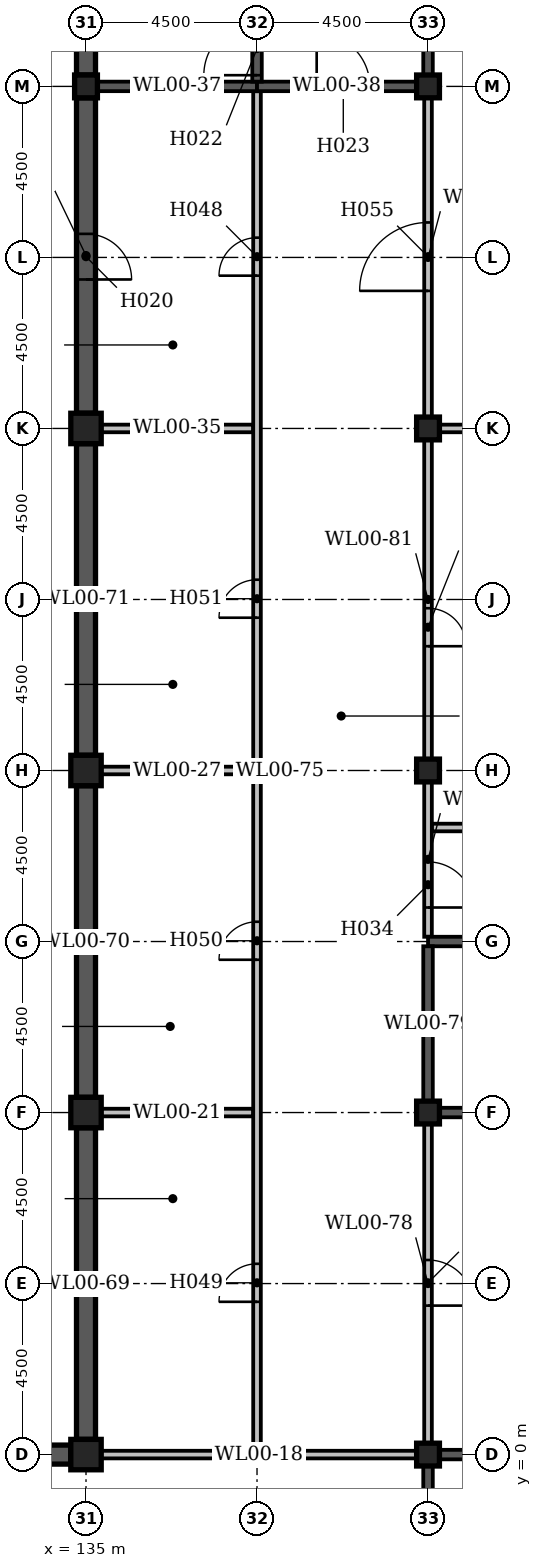
"""IFC4 building model, lengths in metres.
Left out: names, types, materials, properties, quantities, classifications, styles, units other than length and angle.
Written with IfcOpenShell. Run it as: python <this file> out.ifc"""

import sys

from ifc_helpers import new_model, si_unit, direction, frame, frame_2d, origin, origin_2d, place, context, subcontext, project, spatial, rectangle, extrude, element, fill, save


model = new_model("IFC4")
c1 = context("Model", 3, precision=1e-05, world=origin(), true_north=direction((0.0, 1.0)))
c2 = subcontext(c1, "Body", "Model", "MODEL_VIEW")
j1 = project(units=[si_unit("LENGTHUNIT", "METRE"), si_unit("PLANEANGLEUNIT", "RADIAN")], contexts=[c1])
p1 = place(None, origin())
s1 = spatial("IfcSite", under=j1, at=p1, CompositionType="ELEMENT")
p2 = place(p1, origin())
s2 = spatial("IfcBuilding", under=s1, at=p2, CompositionType="ELEMENT")
p3 = place(p2, origin())
s3 = spatial("IfcBuildingStorey", under=s2, at=p3, CompositionType="ELEMENT", Elevation=0.0)
for number, where, z_axis, x_axis in (
    (1, (135.0, 0.0, -0.3), (0.0, 0.0, 1.0), (1.0, 0.0, 0.0)),
    (2, (135.0, 9.0, -0.3), (0.0, 0.0, 1.0), (1.0, 0.0, 0.0)),
    (3, (135.0, 18.0, -0.3), (0.0, 0.0, 1.0), (1.0, 0.0, 0.0)),
    (4, (135.0, 27.0, -0.3), (0.0, 0.0, 1.0), (1.0, 0.0, 0.0)),
):
    element("IfcColumn", number, at=place(p3, frame(where, z_axis=z_axis, x_axis=x_axis)), inside=s3, PredefinedType="COLUMN", context=c2, shape_type="SweptSolid", body=[
        extrude(rectangle(XDim=0.8, YDim=0.8, at=origin_2d()), origin(), (0.0, 0.0, 1.0), 9.0),
    ])
p4 = place(p3, frame((135.0, 36.0, -0.3), z_axis=(0.0, 0.0, 1.0), x_axis=(1.0, 0.0, 0.0)))
e5 = element("IfcColumn", 5, at=p4, inside=s3, PredefinedType="COLUMN", context=c2, shape_type="SweptSolid", body=[
    extrude(rectangle(XDim=0.6, YDim=0.6, at=origin_2d()), origin(), (0.0, 0.0, 1.0), 9.0),
])
for number, where, z_axis, x_axis in (
    (6, (144.0, 0.0, 0.0), (0.0, 0.0, 1.0), (1.0, 0.0, 0.0)),
    (7, (144.0, 9.0, 0.0), (0.0, 0.0, 1.0), (1.0, 0.0, 0.0)),
    (8, (144.0, 18.0, 0.0), (0.0, 0.0, 1.0), (1.0, 0.0, 0.0)),
    (9, (144.0, 27.0, 0.0), (0.0, 0.0, 1.0), (1.0, 0.0, 0.0)),
    (10, (144.0, 36.0, 0.0), (0.0, 0.0, 1.0), (1.0, 0.0, 0.0)),
):
    element("IfcColumn", number, at=place(p3, frame(where, z_axis=z_axis, x_axis=x_axis)), inside=s3, PredefinedType="COLUMN", context=c2, shape_type="SweptSolid", body=[
        extrude(rectangle(XDim=0.6, YDim=0.6, at=origin_2d()), origin(), (0.0, 0.0, 1.0), 8.7),
    ])
p5 = place(p3, frame((126.3, 0.0, 0.0), z_axis=(0.0, 0.0, 1.0), x_axis=(1.0, 0.0, 0.0)))
e11 = element("IfcWall", 11, at=p5, inside=s3, PredefinedType="STANDARD", context=c2, shape_type="SweptSolid", body=[
    extrude(rectangle(XDim=8.3, YDim=0.5, at=frame_2d((4.15, 0.0))), origin(), (0.0, 0.0, 1.0), 9.0),
])
p6 = place(p5, frame((1.82, 0.0, 0.0)))
e12 = element("IfcOpeningElement", 12, at=p6, cuts=e11, PredefinedType="OPENING", context=c2, shape_type="SweptSolid", body=[
    extrude(rectangle(XDim=1.8, YDim=2.4, at=frame_2d((0.9, 1.2))), frame((0.0, 0.262, 0.0), z_axis=(0.0, -1.0, 0.0), x_axis=(1.0, 0.0, 0.0)), (0.0, 0.0, 1.0), 0.524),
])
p7 = place(p3, frame((135.4, 0.0, 0.0), z_axis=(0.0, 0.0, 1.0), x_axis=(1.0, 0.0, 0.0)))
e13 = element("IfcWall", 13, at=p7, inside=s3, PredefinedType="STANDARD", context=c2, shape_type="SweptSolid", body=[
    extrude(rectangle(XDim=8.3, YDim=0.2, at=frame_2d((4.15, 0.0))), origin(), (0.0, 0.0, 1.0), 8.7),
])
p8 = place(p3, frame((144.3, 0.0, 0.0), z_axis=(0.0, 0.0, 1.0), x_axis=(1.0, 0.0, 0.0)))
e14 = element("IfcWall", 14, at=p8, inside=s3, PredefinedType="STANDARD", context=c2, shape_type="SweptSolid", body=[
    extrude(rectangle(XDim=4.2, YDim=0.25, at=frame_2d((2.1, 0.0))), origin(), (0.0, 0.0, 1.0), 9.0),
])
p9 = place(p3, frame((135.4, 9.0, 0.0), z_axis=(0.0, 0.0, 1.0), x_axis=(1.0, 0.0, 0.0)))
e15 = element("IfcWall", 15, at=p9, inside=s3, PredefinedType="STANDARD", context=c2, shape_type="SweptSolid", body=[
    extrude(rectangle(XDim=4.0, YDim=0.2, at=frame_2d((2.0, 0.0))), origin(), (0.0, 0.0, 1.0), 8.7),
])
p10 = place(p3, frame((144.3, 9.0, 0.0), z_axis=(0.0, 0.0, 1.0), x_axis=(1.0, 0.0, 0.0)))
e16 = element("IfcWall", 16, at=p10, inside=s3, PredefinedType="STANDARD", context=c2, shape_type="SweptSolid", body=[
    extrude(rectangle(XDim=4.2, YDim=0.25, at=frame_2d((2.1, 0.0))), origin(), (0.0, 0.0, 1.0), 9.0),
])
p11 = place(p3, frame((144.0, 13.5, 0.0), z_axis=(0.0, 0.0, 1.0), x_axis=(1.0, 0.0, 0.0)))
e17 = element("IfcWall", 17, at=p11, inside=s3, PredefinedType="STANDARD", context=c2, shape_type="SweptSolid", body=[
    extrude(rectangle(XDim=4.5, YDim=0.25, at=frame_2d((2.25, 0.0))), origin(), (0.0, 0.0, 1.0), 9.0),
])
p12 = place(p11, frame((1.72, 0.0, 0.0)))
e18 = element("IfcOpeningElement", 18, at=p12, cuts=e17, PredefinedType="OPENING", context=c2, shape_type="SweptSolid", body=[
    extrude(rectangle(XDim=1.1, YDim=2.1, at=frame_2d((0.55, 1.05))), frame((0.0, 0.137, 0.0), z_axis=(0.0, -1.0, 0.0), x_axis=(1.0, 0.0, 0.0)), (0.0, 0.0, 1.0), 0.274),
])
p13 = place(p3, frame((144.1, 16.5, 0.0), z_axis=(0.0, 0.0, 1.0), x_axis=(1.0, 0.0, 0.0)))
e19 = element("IfcWall", 19, at=p13, inside=s3, PredefinedType="STANDARD", context=c2, shape_type="SweptSolid", body=[
    extrude(rectangle(XDim=8.725, YDim=0.2, at=frame_2d((4.362, 0.0))), origin(), (0.0, 0.0, 1.0), 8.7),
])
for number, where, z_axis, x_axis in (
    (20, (135.4, 18.0, 0.0), (0.0, 0.0, 1.0), (1.0, 0.0, 0.0)),
    (21, (135.4, 27.0, 0.0), (0.0, 0.0, 1.0), (1.0, 0.0, 0.0)),
):
    element("IfcWall", number, at=place(p3, frame(where, z_axis=z_axis, x_axis=x_axis)), inside=s3, PredefinedType="STANDARD", context=c2, shape_type="SweptSolid", body=[
        extrude(rectangle(XDim=4.0, YDim=0.2, at=frame_2d((2.0, 0.0))), origin(), (0.0, 0.0, 1.0), 8.7),
    ])
p14 = place(p3, frame((144.3, 27.0, 0.0), z_axis=(0.0, 0.0, 1.0), x_axis=(1.0, 0.0, 0.0)))
e22 = element("IfcWall", 22, at=p14, inside=s3, PredefinedType="STANDARD", context=c2, shape_type="SweptSolid", body=[
    extrude(rectangle(XDim=8.4, YDim=0.2, at=frame_2d((4.2, 0.0))), origin(), (0.0, 0.0, 1.0), 8.7),
])
p15 = place(p3, frame((135.3, 36.0, 0.0), z_axis=(0.0, 0.0, 1.0), x_axis=(1.0, 0.0, 0.0)))
e23 = element("IfcWall", 23, at=p15, inside=s3, PredefinedType="STANDARD", context=c2, shape_type="SweptSolid", body=[
    extrude(rectangle(XDim=4.2, YDim=0.25, at=frame_2d((2.1, 0.0))), origin(), (0.0, 0.0, 1.0), 9.0),
])
p16 = place(p3, frame((139.5, 36.0, 0.0), z_axis=(0.0, 0.0, 1.0), x_axis=(1.0, 0.0, 0.0)))
e24 = element("IfcWall", 24, at=p16, inside=s3, PredefinedType="STANDARD", context=c2, shape_type="SweptSolid", body=[
    extrude(rectangle(XDim=4.2, YDim=0.25, at=frame_2d((2.1, 0.0))), origin(), (0.0, 0.0, 1.0), 8.7),
])
p17 = place(p16, frame((1.57, 0.0, 0.0)))
e25 = element("IfcOpeningElement", 25, at=p17, cuts=e24, PredefinedType="OPENING", context=c2, shape_type="SweptSolid", body=[
    extrude(rectangle(XDim=1.4, YDim=2.1, at=frame_2d((0.7, 1.05))), frame((0.0, 0.137, 0.0), z_axis=(0.0, -1.0, 0.0), x_axis=(1.0, 0.0, 0.0)), (0.0, 0.0, 1.0), 0.274),
])
for number, where, z_axis, x_axis in (
    (26, (135.0, 0.4, 0.0), (0.0, 0.0, 1.0), (0.0, 1.0, 0.0)),
    (27, (135.0, 9.4, 0.0), (0.0, 0.0, 1.0), (0.0, 1.0, 0.0)),
    (28, (135.0, 18.4, 0.0), (0.0, 0.0, 1.0), (0.0, 1.0, 0.0)),
):
    element("IfcWall", number, at=place(p3, frame(where, z_axis=z_axis, x_axis=x_axis)), inside=s3, PredefinedType="STANDARD", context=c2, shape_type="SweptSolid", body=[
        extrude(rectangle(XDim=8.2, YDim=0.5, at=frame_2d((4.1, 0.0))), origin(), (0.0, 0.0, 1.0), 9.0),
    ])
p18 = place(p3, frame((135.0, 27.4, 0.0), z_axis=(0.0, 0.0, 1.0), x_axis=(0.0, 1.0, 0.0)))
e29 = element("IfcWall", 29, at=p18, inside=s3, PredefinedType="STANDARD", context=c2, shape_type="SweptSolid", body=[
    extrude(rectangle(XDim=8.3, YDim=0.5, at=frame_2d((4.15, 0.0))), origin(), (0.0, 0.0, 1.0), 9.0),
])
p19 = place(p18, frame((3.52, 0.0, 0.0)))
e30 = element("IfcOpeningElement", 30, at=p19, cuts=e29, PredefinedType="OPENING", context=c2, shape_type="SweptSolid", body=[
    extrude(rectangle(XDim=1.2, YDim=2.4, at=frame_2d((0.6, 1.2))), frame((0.0, 0.262, 0.0), z_axis=(0.0, -1.0, 0.0), x_axis=(1.0, 0.0, 0.0)), (0.0, 0.0, 1.0), 0.524),
])
p20 = place(p3, frame((135.0, 36.3, 0.0), z_axis=(0.0, 0.0, 1.0), x_axis=(0.0, 1.0, 0.0)))
e31 = element("IfcWall", 31, at=p20, inside=s3, PredefinedType="STANDARD", context=c2, shape_type="SweptSolid", body=[
    extrude(rectangle(XDim=8.3, YDim=0.5, at=frame_2d((4.15, 0.0))), origin(), (0.0, 0.0, 1.0), 9.0),
])
p21 = place(p3, frame((139.5, 0.1, 0.0), z_axis=(0.0, 0.0, 1.0), x_axis=(0.0, 1.0, 0.0)))
e32 = element("IfcWall", 32, at=p21, inside=s3, PredefinedType="STANDARD", context=c2, shape_type="SweptSolid", body=[
    extrude(rectangle(XDim=35.775, YDim=0.2, at=frame_2d((17.887, 0.0))), origin(), (0.0, 0.0, 1.0), 8.7),
])
p22 = place(p21, frame((30.92, 0.0, 0.0)))
e33 = element("IfcOpeningElement", 33, at=p22, cuts=e32, PredefinedType="OPENING", context=c2, shape_type="SweptSolid", body=[
    extrude(rectangle(XDim=1.0, YDim=2.1, at=frame_2d((0.5, 1.05))), frame((0.0, 0.112, 0.0), z_axis=(0.0, -1.0, 0.0), x_axis=(1.0, 0.0, 0.0)), (0.0, 0.0, 1.0), 0.224),
])
p23 = place(p21, frame((3.92, 0.0, 0.0)))
e34 = element("IfcOpeningElement", 34, at=p23, cuts=e32, PredefinedType="OPENING", context=c2, shape_type="SweptSolid", body=[
    extrude(rectangle(XDim=1.0, YDim=2.1, at=frame_2d((0.5, 1.05))), frame((0.0, 0.112, 0.0), z_axis=(0.0, -1.0, 0.0), x_axis=(1.0, 0.0, 0.0)), (0.0, 0.0, 1.0), 0.224),
])
p24 = place(p21, frame((12.92, 0.0, 0.0)))
e35 = element("IfcOpeningElement", 35, at=p24, cuts=e32, PredefinedType="OPENING", context=c2, shape_type="SweptSolid", body=[
    extrude(rectangle(XDim=1.0, YDim=2.1, at=frame_2d((0.5, 1.05))), frame((0.0, 0.112, 0.0), z_axis=(0.0, -1.0, 0.0), x_axis=(1.0, 0.0, 0.0)), (0.0, 0.0, 1.0), 0.224),
])
p25 = place(p21, frame((21.92, 0.0, 0.0)))
e36 = element("IfcOpeningElement", 36, at=p25, cuts=e32, PredefinedType="OPENING", context=c2, shape_type="SweptSolid", body=[
    extrude(rectangle(XDim=1.0, YDim=2.1, at=frame_2d((0.5, 1.05))), frame((0.0, 0.112, 0.0), z_axis=(0.0, -1.0, 0.0), x_axis=(1.0, 0.0, 0.0)), (0.0, 0.0, 1.0), 0.224),
])
p26 = place(p3, frame((139.5, 36.125, 0.0), z_axis=(0.0, 0.0, 1.0), x_axis=(0.0, 1.0, 0.0)))
e37 = element("IfcWall", 37, at=p26, inside=s3, PredefinedType="STANDARD", context=c2, shape_type="SweptSolid", body=[
    extrude(rectangle(XDim=8.7, YDim=0.25, at=frame_2d((4.35, 0.0))), origin(), (0.0, 0.0, 1.0), 9.0),
])
p27 = place(p26, frame((0.17, 0.0, 0.0)))
e38 = element("IfcOpeningElement", 38, at=p27, cuts=e37, PredefinedType="OPENING", context=c2, shape_type="SweptSolid", body=[
    extrude(rectangle(XDim=1.4, YDim=2.1, at=frame_2d((0.7, 1.05))), frame((0.0, 0.137, 0.0), z_axis=(0.0, -1.0, 0.0), x_axis=(1.0, 0.0, 0.0)), (0.0, 0.0, 1.0), 0.274),
])
p28 = place(p3, frame((144.0, -8.7, 0.0), z_axis=(0.0, 0.0, 1.0), x_axis=(0.0, 1.0, 0.0)))
e39 = element("IfcWall", 39, at=p28, inside=s3, PredefinedType="STANDARD", context=c2, shape_type="SweptSolid", body=[
    extrude(rectangle(XDim=8.4, YDim=0.25, at=frame_2d((4.2, 0.0))), origin(), (0.0, 0.0, 1.0), 9.0),
])
p29 = place(p28, frame((0.12, 0.0, 0.0)))
e40 = element("IfcOpeningElement", 40, at=p29, cuts=e39, PredefinedType="OPENING", context=c2, shape_type="SweptSolid", body=[
    extrude(rectangle(XDim=1.2, YDim=2.1, at=frame_2d((0.6, 1.05))), frame((0.0, 0.137, 0.0), z_axis=(0.0, -1.0, 0.0), x_axis=(1.0, 0.0, 0.0)), (0.0, 0.0, 1.0), 0.274),
])
p30 = place(p3, frame((144.0, 0.3, 0.0), z_axis=(0.0, 0.0, 1.0), x_axis=(0.0, 1.0, 0.0)))
e41 = element("IfcWall", 41, at=p30, inside=s3, PredefinedType="STANDARD", context=c2, shape_type="SweptSolid", body=[
    extrude(rectangle(XDim=8.4, YDim=0.2, at=frame_2d((4.2, 0.0))), origin(), (0.0, 0.0, 1.0), 8.7),
])
p31 = place(p30, frame((3.62, 0.0, 0.0)))
e42 = element("IfcOpeningElement", 42, at=p31, cuts=e41, PredefinedType="OPENING", context=c2, shape_type="SweptSolid", body=[
    extrude(rectangle(XDim=1.2, YDim=2.1, at=frame_2d((0.6, 1.05))), frame((0.0, 0.112, 0.0), z_axis=(0.0, -1.0, 0.0), x_axis=(1.0, 0.0, 0.0)), (0.0, 0.0, 1.0), 0.224),
])
p32 = place(p3, frame((144.0, 9.3, 0.0), z_axis=(0.0, 0.0, 1.0), x_axis=(0.0, 1.0, 0.0)))
e43 = element("IfcWall", 43, at=p32, inside=s3, PredefinedType="STANDARD", context=c2, shape_type="SweptSolid", body=[
    extrude(rectangle(XDim=4.075, YDim=0.25, at=frame_2d((2.038, 0.0))), origin(), (0.0, 0.0, 1.0), 9.0),
])
p33 = place(p3, frame((144.0, 13.625, 0.0), z_axis=(0.0, 0.0, 1.0), x_axis=(0.0, 1.0, 0.0)))
e44 = element("IfcWall", 44, at=p33, inside=s3, PredefinedType="STANDARD", context=c2, shape_type="SweptSolid", body=[
    extrude(rectangle(XDim=4.075, YDim=0.2, at=frame_2d((2.038, 0.0))), origin(), (0.0, 0.0, 1.0), 8.7),
])
p34 = place(p33, frame((0.77, 0.0, 0.0)))
e45 = element("IfcOpeningElement", 45, at=p34, cuts=e44, PredefinedType="OPENING", context=c2, shape_type="SweptSolid", body=[
    extrude(rectangle(XDim=1.2, YDim=2.1, at=frame_2d((0.6, 1.05))), frame((0.0, 0.112, 0.0), z_axis=(0.0, -1.0, 0.0), x_axis=(1.0, 0.0, 0.0)), (0.0, 0.0, 1.0), 0.224),
])
p35 = place(p3, frame((144.0, 18.3, 0.0), z_axis=(0.0, 0.0, 1.0), x_axis=(0.0, 1.0, 0.0)))
e46 = element("IfcWall", 46, at=p35, inside=s3, PredefinedType="STANDARD", context=c2, shape_type="SweptSolid", body=[
    extrude(rectangle(XDim=8.4, YDim=0.2, at=frame_2d((4.2, 0.0))), origin(), (0.0, 0.0, 1.0), 8.7),
])
p36 = place(p35, frame((2.97, 0.0, 0.0)))
e47 = element("IfcOpeningElement", 47, at=p36, cuts=e46, PredefinedType="OPENING", context=c2, shape_type="SweptSolid", body=[
    extrude(rectangle(XDim=1.0, YDim=2.1, at=frame_2d((0.5, 1.05))), frame((0.0, 0.112, 0.0), z_axis=(0.0, -1.0, 0.0), x_axis=(1.0, 0.0, 0.0)), (0.0, 0.0, 1.0), 0.224),
])
p37 = place(p3, frame((144.0, 27.3, 0.0), z_axis=(0.0, 0.0, 1.0), x_axis=(0.0, 1.0, 0.0)))
e48 = element("IfcWall", 48, at=p37, inside=s3, PredefinedType="STANDARD", context=c2, shape_type="SweptSolid", body=[
    extrude(rectangle(XDim=8.4, YDim=0.2, at=frame_2d((4.2, 0.0))), origin(), (0.0, 0.0, 1.0), 8.7),
])
p38 = place(p37, frame((3.32, 0.0, 0.0)))
e49 = element("IfcOpeningElement", 49, at=p38, cuts=e48, PredefinedType="OPENING", context=c2, shape_type="SweptSolid", body=[
    extrude(rectangle(XDim=1.8, YDim=2.4, at=frame_2d((0.9, 1.2))), frame((0.0, 0.112, 0.0), z_axis=(0.0, -1.0, 0.0), x_axis=(1.0, 0.0, 0.0)), (0.0, 0.0, 1.0), 0.224),
])
p39 = place(p3, frame((144.0, 36.3, 0.0), z_axis=(0.0, 0.0, 1.0), x_axis=(0.0, 1.0, 0.0)))
e50 = element("IfcWall", 50, at=p39, inside=s3, PredefinedType="STANDARD", context=c2, shape_type="SweptSolid", body=[
    extrude(rectangle(XDim=8.4, YDim=0.25, at=frame_2d((4.2, 0.0))), origin(), (0.0, 0.0, 1.0), 8.7),
])
p40 = place(p19, frame((1.2, 0.0, 0.0), z_axis=(0.0, 0.0, 1.0), x_axis=(-1.0, 0.0, 0.0)))
e51 = element("IfcDoor", 51, at=p40, inside=s3, OperationType="SINGLE_SWING_RIGHT", PredefinedType="DOOR", context=c2, shape_type="SweptSolid", body=[
    extrude(rectangle(XDim=1.2, YDim=2.4, at=frame_2d((0.6, 1.2))), frame((0.0, 0.025, 0.0), z_axis=(0.0, -1.0, 0.0), x_axis=(1.0, 0.0, 0.0)), (0.0, 0.0, 1.0), 0.05),
])
fill(e30, e51)
p41 = place(p31, frame((1.2, 0.0, 0.0), z_axis=(0.0, 0.0, 1.0), x_axis=(-1.0, 0.0, 0.0)))
e52 = element("IfcDoor", 52, at=p41, inside=s3, OperationType="SINGLE_SWING_RIGHT", PredefinedType="DOOR", context=c2, shape_type="SweptSolid", body=[
    extrude(rectangle(XDim=1.2, YDim=2.1, at=frame_2d((0.6, 1.05))), frame((0.0, 0.025, 0.0), z_axis=(0.0, -1.0, 0.0), x_axis=(1.0, 0.0, 0.0)), (0.0, 0.0, 1.0), 0.05),
])
fill(e42, e52)
p42 = place(p27, origin())
e53 = element("IfcDoor", 53, at=p42, inside=s3, OperationType="DOUBLE_DOOR_SINGLE_SWING", PredefinedType="DOOR", context=c2, shape_type="SweptSolid", body=[
    extrude(rectangle(XDim=1.4, YDim=2.1, at=frame_2d((0.7, 1.05))), frame((0.0, 0.025, 0.0), z_axis=(0.0, -1.0, 0.0), x_axis=(1.0, 0.0, 0.0)), (0.0, 0.0, 1.0), 0.05),
])
fill(e38, e53)
p43 = place(p17, origin())
e54 = element("IfcDoor", 54, at=p43, inside=s3, OperationType="DOUBLE_DOOR_SINGLE_SWING", PredefinedType="DOOR", context=c2, shape_type="SweptSolid", body=[
    extrude(rectangle(XDim=1.4, YDim=2.1, at=frame_2d((0.7, 1.05))), frame((0.0, 0.025, 0.0), z_axis=(0.0, -1.0, 0.0), x_axis=(1.0, 0.0, 0.0)), (0.0, 0.0, 1.0), 0.05),
])
fill(e25, e54)
p44 = place(p34, frame((1.2, 0.0, 0.0), z_axis=(0.0, 0.0, 1.0), x_axis=(-1.0, 0.0, 0.0)))
e55 = element("IfcDoor", 55, at=p44, inside=s3, OperationType="SINGLE_SWING_RIGHT", PredefinedType="DOOR", context=c2, shape_type="SweptSolid", body=[
    extrude(rectangle(XDim=1.2, YDim=2.1, at=frame_2d((0.6, 1.05))), frame((0.0, 0.025, 0.0), z_axis=(0.0, -1.0, 0.0), x_axis=(1.0, 0.0, 0.0)), (0.0, 0.0, 1.0), 0.05),
])
fill(e45, e55)
p45 = place(p22, origin())
e56 = element("IfcDoor", 56, at=p45, inside=s3, OperationType="SINGLE_SWING_LEFT", PredefinedType="DOOR", context=c2, shape_type="SweptSolid", body=[
    extrude(rectangle(XDim=1.0, YDim=2.1, at=frame_2d((0.5, 1.05))), frame((0.0, 0.025, 0.0), z_axis=(0.0, -1.0, 0.0), x_axis=(1.0, 0.0, 0.0)), (0.0, 0.0, 1.0), 0.05),
])
fill(e33, e56)
p46 = place(p23, origin())
e57 = element("IfcDoor", 57, at=p46, inside=s3, OperationType="SINGLE_SWING_LEFT", PredefinedType="DOOR", context=c2, shape_type="SweptSolid", body=[
    extrude(rectangle(XDim=1.0, YDim=2.1, at=frame_2d((0.5, 1.05))), frame((0.0, 0.025, 0.0), z_axis=(0.0, -1.0, 0.0), x_axis=(1.0, 0.0, 0.0)), (0.0, 0.0, 1.0), 0.05),
])
fill(e34, e57)
p47 = place(p24, origin())
e58 = element("IfcDoor", 58, at=p47, inside=s3, OperationType="SINGLE_SWING_LEFT", PredefinedType="DOOR", context=c2, shape_type="SweptSolid", body=[
    extrude(rectangle(XDim=1.0, YDim=2.1, at=frame_2d((0.5, 1.05))), frame((0.0, 0.025, 0.0), z_axis=(0.0, -1.0, 0.0), x_axis=(1.0, 0.0, 0.0)), (0.0, 0.0, 1.0), 0.05),
])
fill(e35, e58)
p48 = place(p25, origin())
e59 = element("IfcDoor", 59, at=p48, inside=s3, OperationType="SINGLE_SWING_LEFT", PredefinedType="DOOR", context=c2, shape_type="SweptSolid", body=[
    extrude(rectangle(XDim=1.0, YDim=2.1, at=frame_2d((0.5, 1.05))), frame((0.0, 0.025, 0.0), z_axis=(0.0, -1.0, 0.0), x_axis=(1.0, 0.0, 0.0)), (0.0, 0.0, 1.0), 0.05),
])
fill(e36, e59)
p49 = place(p36, frame((1.0, 0.0, 0.0), z_axis=(0.0, 0.0, 1.0), x_axis=(-1.0, 0.0, 0.0)))
e60 = element("IfcDoor", 60, at=p49, inside=s3, OperationType="SINGLE_SWING_RIGHT", PredefinedType="DOOR", context=c2, shape_type="SweptSolid", body=[
    extrude(rectangle(XDim=1.0, YDim=2.1, at=frame_2d((0.5, 1.05))), frame((0.0, 0.025, 0.0), z_axis=(0.0, -1.0, 0.0), x_axis=(1.0, 0.0, 0.0)), (0.0, 0.0, 1.0), 0.05),
])
fill(e47, e60)
p50 = place(p38, origin())
e61 = element("IfcDoor", 61, at=p50, inside=s3, OperationType="DOUBLE_DOOR_SINGLE_SWING", PredefinedType="DOOR", context=c2, shape_type="SweptSolid", body=[
    extrude(rectangle(XDim=1.8, YDim=2.4, at=frame_2d((0.9, 1.2))), frame((0.0, 0.025, 0.0), z_axis=(0.0, -1.0, 0.0), x_axis=(1.0, 0.0, 0.0)), (0.0, 0.0, 1.0), 0.05),
])
fill(e49, e61)
save(model, sys.argv[1])
